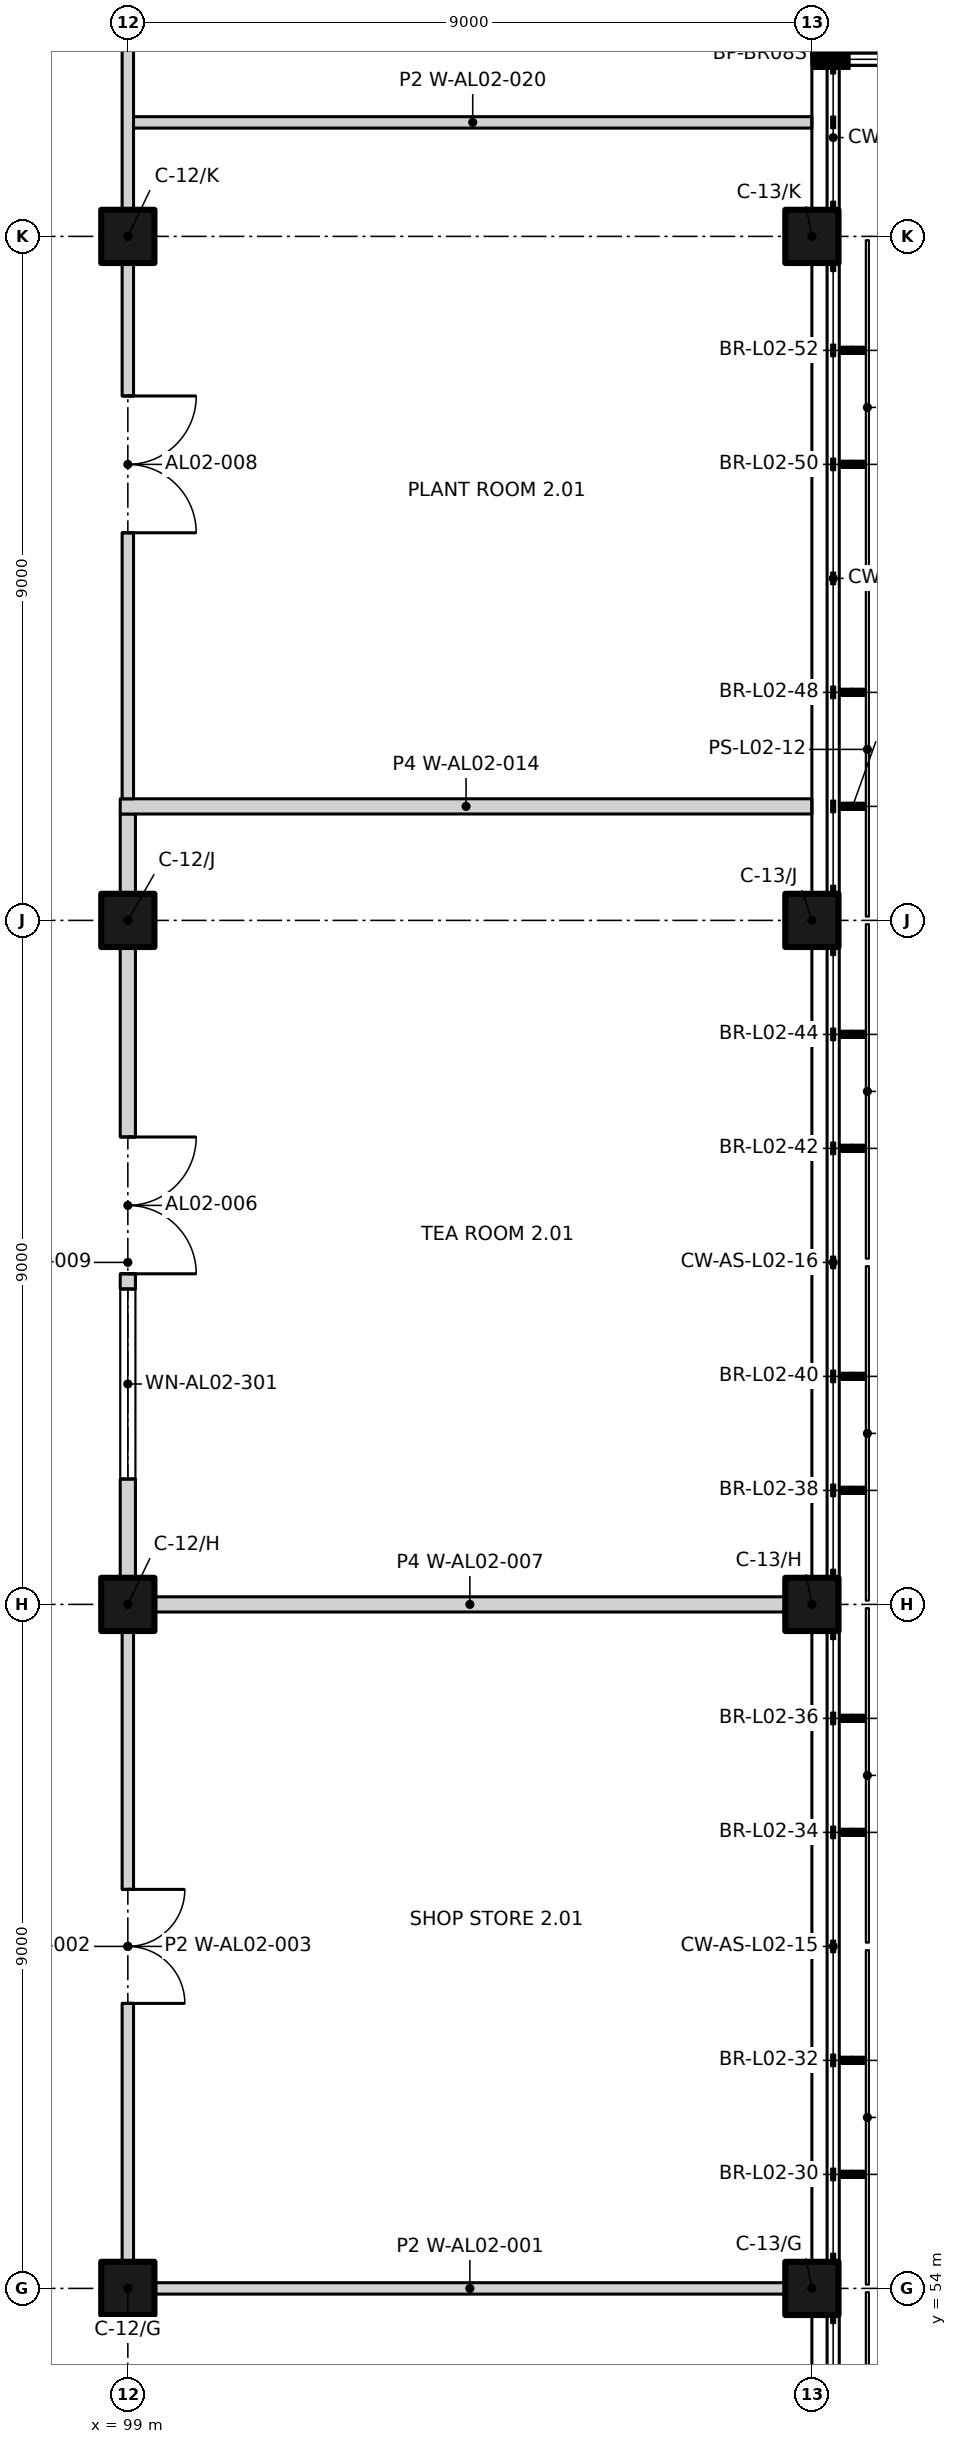
"""IFC4 building model, lengths in metres.
Left out: names, types, materials, properties, quantities, classifications, styles, units other than length and angle.
Written with IfcOpenShell. Run it as: python <this file> out.ifc"""

import sys

from ifc_helpers import new_model, si_unit, direction, frame, frame_2d, origin, origin_2d, place, context, subcontext, project, spatial, rectangle, extrude, element, fill, save


model = new_model("IFC4")
c1 = context("Model", 3, precision=1e-05, world=origin(), true_north=direction((0.0, 1.0)))
c2 = subcontext(c1, "Body", "Model", "MODEL_VIEW")
j1 = project(units=[si_unit("LENGTHUNIT", "METRE"), si_unit("PLANEANGLEUNIT", "RADIAN")], contexts=[c1])
p1 = place(None, origin())
s1 = spatial("IfcSite", under=j1, at=p1, CompositionType="ELEMENT")
p2 = place(p1, origin())
s2 = spatial("IfcBuilding", under=s1, at=p2, CompositionType="ELEMENT")
p3 = place(p2, frame((0.0, 0.0, 10.5)))
s3 = spatial("IfcBuildingStorey", under=s2, at=p3, CompositionType="ELEMENT", Elevation=10.5)
for number, where, z_axis, x_axis in (
    (1, (99.0, 54.0, 0.0), (0.0, 0.0, 1.0), (1.0, 0.0, 0.0)),
    (2, (108.0, 54.0, 0.0), (0.0, 0.0, 1.0), (1.0, 0.0, 0.0)),
    (3, (99.0, 63.0, 0.0), (0.0, 0.0, 1.0), (1.0, 0.0, 0.0)),
    (4, (108.0, 63.0, 0.0), (0.0, 0.0, 1.0), (1.0, 0.0, 0.0)),
    (5, (99.0, 72.0, 0.0), (0.0, 0.0, 1.0), (1.0, 0.0, 0.0)),
    (6, (108.0, 72.0, 0.0), (0.0, 0.0, 1.0), (1.0, 0.0, 0.0)),
    (7, (99.0, 81.0, 0.0), (0.0, 0.0, 1.0), (1.0, 0.0, 0.0)),
    (8, (108.0, 81.0, 0.0), (0.0, 0.0, 1.0), (1.0, 0.0, 0.0)),
):
    element("IfcColumn", number, at=place(p3, frame(where, z_axis=z_axis, x_axis=x_axis)), inside=s3, PredefinedType="COLUMN", context=c2, shape_type="SweptSolid", body=[
        extrude(rectangle(XDim=0.7, YDim=0.7, at=origin_2d()), origin(), (0.0, 0.0, 1.0), 4.5),
    ])
p4 = place(p3, frame((99.35, 54.0, 0.0), z_axis=(0.0, 0.0, 1.0), x_axis=(1.0, 0.0, 0.0)))
e9 = element("IfcWall", 9, at=p4, inside=s3, PredefinedType="PARTITIONING", context=c2, shape_type="SweptSolid", body=[
    extrude(rectangle(XDim=8.3, YDim=0.15, at=frame_2d((4.15, 0.0))), origin(), (0.0, 0.0, 1.0), 3.7),
])
p5 = place(p3, frame((99.0, 54.35, 0.0), z_axis=(0.0, 0.0, 1.0), x_axis=(0.0, 1.0, 0.0)))
e10 = element("IfcWall", 10, at=p5, inside=s3, PredefinedType="PARTITIONING", context=c2, shape_type="SweptSolid", body=[
    extrude(rectangle(XDim=8.3, YDim=0.15, at=frame_2d((4.15, 0.0))), origin(), (0.0, 0.0, 1.0), 3.7),
])
p6 = place(p5, frame((4.9, 0.0, 0.0), z_axis=(0.0, 0.0, 1.0), x_axis=(-1.0, 0.0, 0.0)))
e11 = element("IfcOpeningElement", 11, at=p6, cuts=e10, PredefinedType="OPENING", context=c2, shape_type="SweptSolid", body=[
    extrude(rectangle(XDim=1.5, YDim=2.1, at=frame_2d((0.75, 1.05))), frame((0.0, 0.085, 0.0), z_axis=(0.0, -1.0, 0.0), x_axis=(1.0, 0.0, 0.0)), (0.0, 0.0, 1.0), 0.17),
])
p7 = place(p3, frame((99.35, 63.0, 0.0), z_axis=(0.0, 0.0, 1.0), x_axis=(1.0, 0.0, 0.0)))
e12 = element("IfcWall", 12, at=p7, inside=s3, PredefinedType="PARTITIONING", context=c2, shape_type="SweptSolid", body=[
    extrude(rectangle(XDim=8.3, YDim=0.2, at=frame_2d((4.15, 0.0))), origin(), (0.0, 0.0, 1.0), 3.7),
])
p8 = place(p3, frame((99.0, 63.35, 0.0), z_axis=(0.0, 0.0, 1.0), x_axis=(0.0, 1.0, 0.0)))
e13 = element("IfcWall", 13, at=p8, inside=s3, PredefinedType="PARTITIONING", context=c2, shape_type="SweptSolid", body=[
    extrude(rectangle(XDim=8.3, YDim=0.2, at=frame_2d((4.15, 0.0))), origin(), (0.0, 0.0, 1.0), 3.7),
])
p9 = place(p8, frame((5.8, 0.0, 0.0), z_axis=(0.0, 0.0, 1.0), x_axis=(-1.0, 0.0, 0.0)))
e14 = element("IfcOpeningElement", 14, at=p9, cuts=e13, PredefinedType="OPENING", context=c2, shape_type="SweptSolid", body=[
    extrude(rectangle(XDim=1.8, YDim=2.1, at=frame_2d((0.9, 1.05))), frame((0.0, 0.11, 0.0), z_axis=(0.0, -1.0, 0.0), x_axis=(1.0, 0.0, 0.0)), (0.0, 0.0, 1.0), 0.22),
])
p10 = place(p8, frame((1.3, 0.0, 0.15)))
e15 = element("IfcOpeningElement", 15, at=p10, cuts=e13, PredefinedType="OPENING", context=c2, shape_type="SweptSolid", body=[
    extrude(rectangle(XDim=2.5, YDim=2.4, at=frame_2d((1.25, 1.2))), frame((0.0, 0.11, 0.0), z_axis=(0.0, -1.0, 0.0), x_axis=(1.0, 0.0, 0.0)), (0.0, 0.0, 1.0), 0.22),
])
p11 = place(p3, frame((99.0, 72.35, 0.0), z_axis=(0.0, 0.0, 1.0), x_axis=(0.0, 1.0, 0.0)))
e16 = element("IfcWall", 16, at=p11, inside=s3, PredefinedType="PARTITIONING", context=c2, shape_type="SweptSolid", body=[
    extrude(rectangle(XDim=1.05, YDim=0.2, at=frame_2d((0.525, 0.0))), origin(), (0.0, 0.0, 1.0), 3.7),
])
p12 = place(p3, frame((98.9, 73.5, 0.0), z_axis=(0.0, 0.0, 1.0), x_axis=(1.0, 0.0, 0.0)))
e17 = element("IfcWall", 17, at=p12, inside=s3, PredefinedType="PARTITIONING", context=c2, shape_type="SweptSolid", body=[
    extrude(rectangle(XDim=9.1, YDim=0.2, at=frame_2d((4.55, 0.0))), origin(), (0.0, 0.0, 1.0), 3.65),
])
p13 = place(p3, frame((99.0, 73.6, 0.0), z_axis=(0.0, 0.0, 1.0), x_axis=(0.0, 1.0, 0.0)))
e18 = element("IfcWall", 18, at=p13, inside=s3, PredefinedType="PARTITIONING", context=c2, shape_type="SweptSolid", body=[
    extrude(rectangle(XDim=7.05, YDim=0.15, at=frame_2d((3.525, 0.0))), origin(), (0.0, 0.0, 1.0), 3.7),
])
p14 = place(p13, frame((5.3, 0.0, 0.0), z_axis=(0.0, 0.0, 1.0), x_axis=(-1.0, 0.0, 0.0)))
e19 = element("IfcOpeningElement", 19, at=p14, cuts=e18, PredefinedType="OPENING", context=c2, shape_type="SweptSolid", body=[
    extrude(rectangle(XDim=1.8, YDim=2.4, at=frame_2d((0.9, 1.2))), frame((0.0, 0.085, 0.0), z_axis=(0.0, -1.0, 0.0), x_axis=(1.0, 0.0, 0.0)), (0.0, 0.0, 1.0), 0.17),
])
p15 = place(p3, frame((99.0, 81.35, 0.0), z_axis=(0.0, 0.0, 1.0), x_axis=(0.0, 1.0, 0.0)))
e20 = element("IfcWall", 20, at=p15, inside=s3, PredefinedType="PARTITIONING", context=c2, shape_type="SweptSolid", body=[
    extrude(rectangle(XDim=8.3, YDim=0.15, at=frame_2d((4.15, 0.0))), origin(), (0.0, 0.0, 1.0), 3.7),
])
p16 = place(p3, frame((99.075, 82.5, 0.0), z_axis=(0.0, 0.0, 1.0), x_axis=(1.0, 0.0, 0.0)))
e21 = element("IfcWall", 21, at=p16, inside=s3, PredefinedType="PARTITIONING", context=c2, shape_type="SweptSolid", body=[
    extrude(rectangle(XDim=8.925, YDim=0.15, at=frame_2d((4.462, 0.0))), origin(), (0.0, 0.0, 1.0), 3.65),
])
p17 = place(p6, origin())
e22 = element("IfcDoor", 22, at=p17, inside=s3, OperationType="DOUBLE_DOOR_SINGLE_SWING", PredefinedType="DOOR", context=c2, shape_type="SweptSolid", body=[
    extrude(rectangle(XDim=1.5, YDim=2.1, at=frame_2d((0.75, 1.05))), frame((0.0, 0.025, 0.0), z_axis=(0.0, -1.0, 0.0), x_axis=(1.0, 0.0, 0.0)), (0.0, 0.0, 1.0), 0.05),
])
fill(e11, e22)
p18 = place(p9, origin())
e23 = element("IfcDoor", 23, at=p18, inside=s3, OperationType="DOUBLE_DOOR_SINGLE_SWING", PredefinedType="DOOR", context=c2, shape_type="SweptSolid", body=[
    extrude(rectangle(XDim=1.8, YDim=2.1, at=frame_2d((0.9, 1.05))), frame((0.0, 0.025, 0.0), z_axis=(0.0, -1.0, 0.0), x_axis=(1.0, 0.0, 0.0)), (0.0, 0.0, 1.0), 0.05),
])
fill(e14, e23)
p19 = place(p14, origin())
e24 = element("IfcDoor", 24, at=p19, inside=s3, OperationType="DOUBLE_DOOR_SINGLE_SWING", PredefinedType="DOOR", context=c2, shape_type="SweptSolid", body=[
    extrude(rectangle(XDim=1.8, YDim=2.4, at=frame_2d((0.9, 1.2))), frame((0.0, 0.025, 0.0), z_axis=(0.0, -1.0, 0.0), x_axis=(1.0, 0.0, 0.0)), (0.0, 0.0, 1.0), 0.05),
])
fill(e19, e24)
p20 = place(p10, origin())
e25 = element("IfcWindow", 25, at=p20, inside=s3, PartitioningType="SINGLE_PANEL", PredefinedType="WINDOW", context=c2, shape_type="SweptSolid", body=[
    extrude(rectangle(XDim=2.5, YDim=2.4, at=frame_2d((1.25, 1.2))), frame((0.0, 0.03, 0.0), z_axis=(0.0, -1.0, 0.0), x_axis=(1.0, 0.0, 0.0)), (0.0, 0.0, 1.0), 0.06),
])
fill(e15, e25)
save(model, sys.argv[1])
